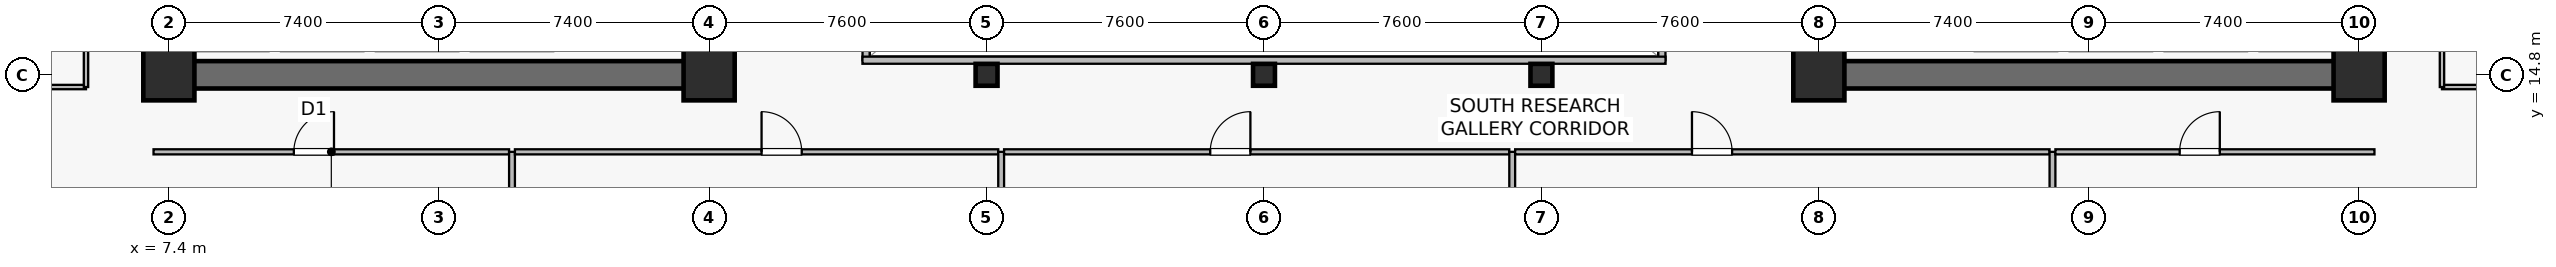
"""IFC4 building model, lengths in metres.
Left out: names, types, materials, properties, quantities, classifications, styles, units other than length and angle.
Written with IfcOpenShell. Run it as: python <this file> out.ifc"""

import sys

from ifc_helpers import new_model, si_unit, direction, frame, frame_2d, origin, origin_2d, place, context, subcontext, project, spatial, rectangle, hollow_rectangle, extrude, source, transform, mapped, element, fill, save


model = new_model("IFC4")
c1 = context("Model", 3, precision=1e-05, world=origin(), true_north=direction((0.0, 1.0)))
c2 = subcontext(c1, "Body", "Model", "MODEL_VIEW")
j1 = project(units=[si_unit("LENGTHUNIT", "METRE"), si_unit("PLANEANGLEUNIT", "RADIAN")], contexts=[c1])
p1 = place(None, origin())
s1 = spatial("IfcSite", under=j1, at=p1, CompositionType="ELEMENT")
p2 = place(p1, origin())
s2 = spatial("IfcBuilding", under=s1, at=p2, CompositionType="ELEMENT")
p3 = place(p2, frame((0.0, 0.0, 62.1)))
s3 = spatial("IfcBuildingStorey", under=s2, at=p3, CompositionType="ELEMENT", Elevation=62.1)
p4 = place(p3, frame((7.025, 14.8, 0.0), z_axis=(0.0, 0.0, 1.0), x_axis=(1.0, 0.0, 0.0)))
e1 = element("IfcWall", 1, at=p4, inside=s3, PredefinedType="SHEAR", context=c2, shape_type="SweptSolid", body=[
    extrude(rectangle(XDim=15.55, YDim=0.75, at=frame_2d((7.775, 0.0))), origin(), (0.0, 0.0, 1.0), 3.78),
])
p5 = place(p3, frame((7.4, 15.175, 0.0), z_axis=(0.0, 0.0, 1.0), x_axis=(0.0, 1.0, 0.0)))
e2 = element("IfcWall", 2, at=p5, inside=s3, PredefinedType="SHEAR", context=c2, shape_type="SweptSolid", body=[
    extrude(rectangle(XDim=18.25, YDim=0.75, at=frame_2d((9.125, 0.0))), origin(), (0.0, 0.0, 1.0), 3.78),
])
p6 = place(p3, frame((22.2, 15.175, 0.0), z_axis=(0.0, 0.0, 1.0), x_axis=(0.0, 1.0, 0.0)))
e3 = element("IfcWall", 3, at=p6, inside=s3, PredefinedType="SHEAR", context=c2, shape_type="SweptSolid", body=[
    extrude(rectangle(XDim=18.25, YDim=0.75, at=frame_2d((9.125, 0.0))), origin(), (0.0, 0.0, 1.0), 3.78),
])
p7 = place(p6, frame((3.375, 0.0, 0.0)))
e4 = element("IfcOpeningElement", 4, at=p7, cuts=e3, PredefinedType="OPENING", context=c2, shape_type="SweptSolid", body=[
    extrude(rectangle(XDim=1.42, YDim=2.2, at=frame_2d((0.71, 1.1))), frame((0.0, 0.385, 0.0), z_axis=(0.0, -1.0, 0.0), x_axis=(1.0, 0.0, 0.0)), (0.0, 0.0, 1.0), 0.77),
])
p8 = place(p3, frame((52.225, 14.8, 0.0), z_axis=(0.0, 0.0, 1.0), x_axis=(1.0, 0.0, 0.0)))
e5 = element("IfcWall", 5, at=p8, inside=s3, PredefinedType="SHEAR", context=c2, shape_type="SweptSolid", body=[
    extrude(rectangle(XDim=15.55, YDim=0.75, at=frame_2d((7.775, 0.0))), origin(), (0.0, 0.0, 1.0), 3.78),
])
p9 = place(p3, frame((52.6, 15.175, 0.0), z_axis=(0.0, 0.0, 1.0), x_axis=(0.0, 1.0, 0.0)))
e6 = element("IfcWall", 6, at=p9, inside=s3, PredefinedType="SHEAR", context=c2, shape_type="SweptSolid", body=[
    extrude(rectangle(XDim=18.25, YDim=0.75, at=frame_2d((9.125, 0.0))), origin(), (0.0, 0.0, 1.0), 3.78),
])
p10 = place(p9, frame((3.375, 0.0, 0.0)))
e7 = element("IfcOpeningElement", 7, at=p10, cuts=e6, PredefinedType="OPENING", context=c2, shape_type="SweptSolid", body=[
    extrude(rectangle(XDim=1.42, YDim=2.2, at=frame_2d((0.71, 1.1))), frame((0.0, 0.385, 0.0), z_axis=(0.0, -1.0, 0.0), x_axis=(1.0, 0.0, 0.0)), (0.0, 0.0, 1.0), 0.77),
])
p11 = place(p3, frame((67.4, 15.175, 0.0), z_axis=(0.0, 0.0, 1.0), x_axis=(0.0, 1.0, 0.0)))
e8 = element("IfcWall", 8, at=p11, inside=s3, PredefinedType="SHEAR", context=c2, shape_type="SweptSolid", body=[
    extrude(rectangle(XDim=18.25, YDim=0.75, at=frame_2d((9.125, 0.0))), origin(), (0.0, 0.0, 1.0), 3.78),
])
m1 = source(origin(), c2, "Body", "SweptSolid", [
    extrude(rectangle(XDim=1.4, YDim=1.4, at=origin_2d()), origin(), (0.0, 0.0, 1.0), 4.1),
])
for number, where, z_axis, x_axis in (
    (9, (7.4, 14.8, 0.0), (0.0, 0.0, 1.0), (1.0, 0.0, 0.0)),
    (10, (22.2, 14.8, 0.0), (0.0, 0.0, 1.0), (1.0, 0.0, 0.0)),
    (11, (52.6, 14.8, 0.0), (0.0, 0.0, 1.0), (1.0, 0.0, 0.0)),
    (12, (67.4, 14.8, 0.0), (0.0, 0.0, 1.0), (1.0, 0.0, 0.0)),
):
    element("IfcColumn", number, at=place(p3, frame(where, z_axis=z_axis, x_axis=x_axis)), inside=s3, PredefinedType="COLUMN", context=c2, shape_type="MappedRepresentation", body=[
        mapped(m1, transform((0.0, 0.0, 0.0), scale=1.0)),
    ])
m2 = source(origin(), c2, "Body", "SweptSolid", [
    extrude(hollow_rectangle(XDim=0.6, YDim=0.6, WallThickness=0.028, at=origin_2d()), origin(), (0.0, 0.0, 1.0), 4.1),
])
for number, where, z_axis, x_axis in (
    (13, (29.8, 14.8, 0.0), (0.0, 0.0, 1.0), (1.0, 0.0, 0.0)),
    (14, (37.4, 14.8, 0.0), (0.0, 0.0, 1.0), (1.0, 0.0, 0.0)),
    (15, (45.0, 14.8, 0.0), (0.0, 0.0, 1.0), (1.0, 0.0, 0.0)),
):
    element("IfcColumn", number, at=place(p3, frame(where, z_axis=z_axis, x_axis=x_axis)), inside=s3, PredefinedType="COLUMN", context=c2, shape_type="MappedRepresentation", body=[
        mapped(m2, transform((0.0, 0.0, 0.0), scale=1.0)),
    ])
p12 = place(p3, frame((26.5, 15.2, 0.0), z_axis=(0.0, 0.0, 1.0), x_axis=(0.0, 1.0, 0.0)))
e16 = element("IfcWall", 16, at=p12, inside=s3, PredefinedType="SOLIDWALL", context=c2, shape_type="SweptSolid", body=[
    extrude(rectangle(XDim=18.2, YDim=0.195, at=frame_2d((9.1, 0.0))), origin(), (0.0, 0.0, 1.0), 3.78),
])
p13 = place(p12, frame((1.8, 0.0, 0.9)))
e17 = element("IfcOpeningElement", 17, at=p13, cuts=e16, PredefinedType="OPENING", context=c2, shape_type="SweptSolid", body=[
    extrude(rectangle(XDim=1.2, YDim=1.35, at=frame_2d((0.6, 0.675))), frame((0.0, 0.107, 0.0), z_axis=(0.0, -1.0, 0.0), x_axis=(1.0, 0.0, 0.0)), (0.0, 0.0, 1.0), 0.215),
])
p14 = place(p12, frame((13.2, 0.0, 0.9)))
e18 = element("IfcOpeningElement", 18, at=p14, cuts=e16, PredefinedType="OPENING", context=c2, shape_type="SweptSolid", body=[
    extrude(rectangle(XDim=1.2, YDim=1.35, at=frame_2d((0.6, 0.675))), frame((0.0, 0.107, 0.0), z_axis=(0.0, -1.0, 0.0), x_axis=(1.0, 0.0, 0.0)), (0.0, 0.0, 1.0), 0.215),
])
p15 = place(p3, frame((48.3, 15.2, 0.0), z_axis=(0.0, 0.0, 1.0), x_axis=(0.0, 1.0, 0.0)))
e19 = element("IfcWall", 19, at=p15, inside=s3, PredefinedType="SOLIDWALL", context=c2, shape_type="SweptSolid", body=[
    extrude(rectangle(XDim=18.2, YDim=0.195, at=frame_2d((9.1, 0.0))), origin(), (0.0, 0.0, 1.0), 3.78),
])
p16 = place(p15, frame((1.8, 0.0, 0.9)))
e20 = element("IfcOpeningElement", 20, at=p16, cuts=e19, PredefinedType="OPENING", context=c2, shape_type="SweptSolid", body=[
    extrude(rectangle(XDim=1.2, YDim=1.35, at=frame_2d((0.6, 0.675))), frame((0.0, 0.107, 0.0), z_axis=(0.0, -1.0, 0.0), x_axis=(1.0, 0.0, 0.0)), (0.0, 0.0, 1.0), 0.215),
])
p17 = place(p15, frame((13.2, 0.0, 0.9)))
e21 = element("IfcOpeningElement", 21, at=p17, cuts=e19, PredefinedType="OPENING", context=c2, shape_type="SweptSolid", body=[
    extrude(rectangle(XDim=1.2, YDim=1.35, at=frame_2d((0.6, 0.675))), frame((0.0, 0.107, 0.0), z_axis=(0.0, -1.0, 0.0), x_axis=(1.0, 0.0, 0.0)), (0.0, 0.0, 1.0), 0.215),
])
p18 = place(p3, frame((26.4, 15.2, 0.0), z_axis=(0.0, 0.0, 1.0), x_axis=(1.0, 0.0, 0.0)))
e22 = element("IfcWall", 22, at=p18, inside=s3, PredefinedType="SOLIDWALL", context=c2, shape_type="SweptSolid", body=[
    extrude(rectangle(XDim=22.0, YDim=0.195, at=frame_2d((11.0, 0.0))), origin(), (0.0, 0.0, 1.0), 3.78),
])
p19 = place(p3, frame((6.98, 12.69, 0.0), z_axis=(0.0, 0.0, 1.0), x_axis=(1.0, 0.0, 0.0)))
e23 = element("IfcWall", 23, at=p19, inside=s3, PredefinedType="PARTITIONING", context=c2, shape_type="SweptSolid", body=[
    extrude(rectangle(XDim=9.74, YDim=0.14, at=frame_2d((4.87, 0.0))), origin(), (0.0, 0.0, 1.0), 3.115),
])
p20 = place(p19, frame((3.844, 0.0, 0.0)))
e24 = element("IfcOpeningElement", 24, at=p20, cuts=e23, PredefinedType="OPENING", context=c2, shape_type="SweptSolid", body=[
    extrude(rectangle(XDim=1.1, YDim=2.18, at=frame_2d((0.55, 1.09))), frame((0.0, 0.08, 0.0), z_axis=(0.0, -1.0, 0.0), x_axis=(1.0, 0.0, 0.0)), (0.0, 0.0, 1.0), 0.16),
])
p21 = place(p3, frame((16.8, 0.11, 0.0), z_axis=(0.0, 0.0, 1.0), x_axis=(0.0, 1.0, 0.0)))
e25 = element("IfcWall", 25, at=p21, inside=s3, PredefinedType="PARTITIONING", context=c2, shape_type="SweptSolid", body=[
    extrude(rectangle(XDim=12.58, YDim=0.16, at=frame_2d((6.29, 0.0))), origin(), (0.0, 0.0, 1.0), 3.015),
])
p22 = place(p3, frame((16.88, 12.69, 0.0), z_axis=(0.0, 0.0, 1.0), x_axis=(1.0, 0.0, 0.0)))
e26 = element("IfcWall", 26, at=p22, inside=s3, PredefinedType="PARTITIONING", context=c2, shape_type="SweptSolid", body=[
    extrude(rectangle(XDim=13.24, YDim=0.14, at=frame_2d((6.62, 0.0))), origin(), (0.0, 0.0, 1.0), 3.115),
])
p23 = place(p22, frame((6.756, 0.0, 0.0)))
e27 = element("IfcOpeningElement", 27, at=p23, cuts=e26, PredefinedType="OPENING", context=c2, shape_type="SweptSolid", body=[
    extrude(rectangle(XDim=1.1, YDim=2.18, at=frame_2d((0.55, 1.09))), frame((0.0, 0.08, 0.0), z_axis=(0.0, -1.0, 0.0), x_axis=(1.0, 0.0, 0.0)), (0.0, 0.0, 1.0), 0.16),
])
p24 = place(p3, frame((30.2, 1.31, 0.0), z_axis=(0.0, 0.0, 1.0), x_axis=(0.0, 1.0, 0.0)))
e28 = element("IfcWall", 28, at=p24, inside=s3, PredefinedType="PARTITIONING", context=c2, shape_type="SweptSolid", body=[
    extrude(rectangle(XDim=11.38, YDim=0.16, at=frame_2d((5.69, 0.0))), origin(), (0.0, 0.0, 1.0), 3.015),
])
p25 = place(p3, frame((30.28, 12.69, 0.0), z_axis=(0.0, 0.0, 1.0), x_axis=(1.0, 0.0, 0.0)))
e29 = element("IfcWall", 29, at=p25, inside=s3, PredefinedType="PARTITIONING", context=c2, shape_type="SweptSolid", body=[
    extrude(rectangle(XDim=13.84, YDim=0.14, at=frame_2d((6.92, 0.0))), origin(), (0.0, 0.0, 1.0), 3.115),
])
p26 = place(p25, frame((5.648, 0.0, 0.0)))
e30 = element("IfcOpeningElement", 30, at=p26, cuts=e29, PredefinedType="OPENING", context=c2, shape_type="SweptSolid", body=[
    extrude(rectangle(XDim=1.1, YDim=2.18, at=frame_2d((0.55, 1.09))), frame((0.0, 0.08, 0.0), z_axis=(0.0, -1.0, 0.0), x_axis=(1.0, 0.0, 0.0)), (0.0, 0.0, 1.0), 0.16),
])
p27 = place(p3, frame((44.2, 1.31, 0.0), z_axis=(0.0, 0.0, 1.0), x_axis=(0.0, 1.0, 0.0)))
e31 = element("IfcWall", 31, at=p27, inside=s3, PredefinedType="PARTITIONING", context=c2, shape_type="SweptSolid", body=[
    extrude(rectangle(XDim=11.38, YDim=0.16, at=frame_2d((5.69, 0.0))), origin(), (0.0, 0.0, 1.0), 3.015),
])
p28 = place(p3, frame((44.28, 12.69, 0.0), z_axis=(0.0, 0.0, 1.0), x_axis=(1.0, 0.0, 0.0)))
e32 = element("IfcWall", 32, at=p28, inside=s3, PredefinedType="PARTITIONING", context=c2, shape_type="SweptSolid", body=[
    extrude(rectangle(XDim=14.64, YDim=0.14, at=frame_2d((7.32, 0.0))), origin(), (0.0, 0.0, 1.0), 3.115),
])
p29 = place(p28, frame((4.844, 0.0, 0.0)))
e33 = element("IfcOpeningElement", 33, at=p29, cuts=e32, PredefinedType="OPENING", context=c2, shape_type="SweptSolid", body=[
    extrude(rectangle(XDim=1.1, YDim=2.18, at=frame_2d((0.55, 1.09))), frame((0.0, 0.08, 0.0), z_axis=(0.0, -1.0, 0.0), x_axis=(1.0, 0.0, 0.0)), (0.0, 0.0, 1.0), 0.16),
])
p30 = place(p3, frame((59.0, 0.11, 0.0), z_axis=(0.0, 0.0, 1.0), x_axis=(0.0, 1.0, 0.0)))
e34 = element("IfcWall", 34, at=p30, inside=s3, PredefinedType="PARTITIONING", context=c2, shape_type="SweptSolid", body=[
    extrude(rectangle(XDim=12.58, YDim=0.16, at=frame_2d((6.29, 0.0))), origin(), (0.0, 0.0, 1.0), 3.015),
])
p31 = place(p3, frame((59.08, 12.69, 0.0), z_axis=(0.0, 0.0, 1.0), x_axis=(1.0, 0.0, 0.0)))
e35 = element("IfcWall", 35, at=p31, inside=s3, PredefinedType="PARTITIONING", context=c2, shape_type="SweptSolid", body=[
    extrude(rectangle(XDim=8.74, YDim=0.14, at=frame_2d((4.37, 0.0))), origin(), (0.0, 0.0, 1.0), 3.115),
])
p32 = place(p31, frame((3.404, 0.0, 0.0)))
e36 = element("IfcOpeningElement", 36, at=p32, cuts=e35, PredefinedType="OPENING", context=c2, shape_type="SweptSolid", body=[
    extrude(rectangle(XDim=1.1, YDim=2.18, at=frame_2d((0.55, 1.09))), frame((0.0, 0.08, 0.0), z_axis=(0.0, -1.0, 0.0), x_axis=(1.0, 0.0, 0.0)), (0.0, 0.0, 1.0), 0.16),
])
p33 = place(p3, frame((0.11, 14.465, 0.0), z_axis=(0.0, 0.0, 1.0), x_axis=(1.0, 0.0, 0.0)))
e37 = element("IfcWall", 37, at=p33, inside=s3, PredefinedType="PARTITIONING", context=c2, shape_type="SweptSolid", body=[
    extrude(rectangle(XDim=5.02, YDim=0.12, at=frame_2d((2.51, 0.0))), origin(), (0.0, 0.0, 1.0), 3.78),
])
p34 = place(p3, frame((5.13, 14.465, 0.0), z_axis=(0.0, 0.0, 1.0), x_axis=(0.0, 1.0, 0.0)))
e38 = element("IfcWall", 38, at=p34, inside=s3, PredefinedType="PARTITIONING", context=c2, shape_type="SweptSolid", body=[
    extrude(rectangle(XDim=6.475, YDim=0.12, at=frame_2d((3.237, 0.0))), origin(), (0.0, 0.0, 1.0), 3.78),
])
p35 = place(p34, frame((2.788, 0.0, 0.0)))
e39 = element("IfcOpeningElement", 39, at=p35, cuts=e38, PredefinedType="OPENING", context=c2, shape_type="SweptSolid", body=[
    extrude(rectangle(XDim=0.9, YDim=2.1, at=frame_2d((0.45, 1.05))), frame((0.0, 0.07, 0.0), z_axis=(0.0, -1.0, 0.0), x_axis=(1.0, 0.0, 0.0)), (0.0, 0.0, 1.0), 0.14),
])
p36 = place(p3, frame((69.67, 14.465, 0.0), z_axis=(0.0, 0.0, 1.0), x_axis=(1.0, 0.0, 0.0)))
e40 = element("IfcWall", 40, at=p36, inside=s3, PredefinedType="PARTITIONING", context=c2, shape_type="SweptSolid", body=[
    extrude(rectangle(XDim=5.02, YDim=0.12, at=frame_2d((2.51, 0.0))), origin(), (0.0, 0.0, 1.0), 3.78),
])
p37 = place(p3, frame((69.67, 14.465, 0.0), z_axis=(0.0, 0.0, 1.0), x_axis=(0.0, 1.0, 0.0)))
e41 = element("IfcWall", 41, at=p37, inside=s3, PredefinedType="PARTITIONING", context=c2, shape_type="SweptSolid", body=[
    extrude(rectangle(XDim=4.475, YDim=0.12, at=frame_2d((2.237, 0.0))), origin(), (0.0, 0.0, 1.0), 3.78),
])
p38 = place(p37, frame((1.788, 0.0, 0.0)))
e42 = element("IfcOpeningElement", 42, at=p38, cuts=e41, PredefinedType="OPENING", context=c2, shape_type="SweptSolid", body=[
    extrude(rectangle(XDim=0.9, YDim=2.1, at=frame_2d((0.45, 1.05))), frame((0.0, 0.07, 0.0), z_axis=(0.0, -1.0, 0.0), x_axis=(1.0, 0.0, 0.0)), (0.0, 0.0, 1.0), 0.14),
])
m3 = source(origin(), c2, "Body", "SweptSolid", [
    extrude(rectangle(XDim=1.1, YDim=2.18, at=frame_2d((0.55, 1.09))), frame((0.0, 0.025, 0.0), z_axis=(0.0, -1.0, 0.0), x_axis=(1.0, 0.0, 0.0)), (0.0, 0.0, 1.0), 0.05),
])
p39 = place(p20, origin())
e43 = element("IfcDoor", 43, at=p39, inside=s3, OperationType="SINGLE_SWING_RIGHT", PredefinedType="DOOR", context=c2, shape_type="MappedRepresentation", body=[
    mapped(m3, transform((0.0, 0.0, 0.0), scale=1.0)),
])
fill(e24, e43)
p40 = place(p23, origin())
e44 = element("IfcDoor", 44, at=p40, inside=s3, OperationType="SINGLE_SWING_LEFT", PredefinedType="DOOR", context=c2, shape_type="MappedRepresentation", body=[
    mapped(m3, transform((0.0, 0.0, 0.0), scale=1.0)),
])
fill(e27, e44)
p41 = place(p26, origin())
e45 = element("IfcDoor", 45, at=p41, inside=s3, OperationType="SINGLE_SWING_RIGHT", PredefinedType="DOOR", context=c2, shape_type="MappedRepresentation", body=[
    mapped(m3, transform((0.0, 0.0, 0.0), scale=1.0)),
])
fill(e30, e45)
p42 = place(p29, origin())
e46 = element("IfcDoor", 46, at=p42, inside=s3, OperationType="SINGLE_SWING_LEFT", PredefinedType="DOOR", context=c2, shape_type="MappedRepresentation", body=[
    mapped(m3, transform((0.0, 0.0, 0.0), scale=1.0)),
])
fill(e33, e46)
p43 = place(p32, origin())
e47 = element("IfcDoor", 47, at=p43, inside=s3, OperationType="SINGLE_SWING_RIGHT", PredefinedType="DOOR", context=c2, shape_type="MappedRepresentation", body=[
    mapped(m3, transform((0.0, 0.0, 0.0), scale=1.0)),
])
fill(e36, e47)
save(model, sys.argv[1])
